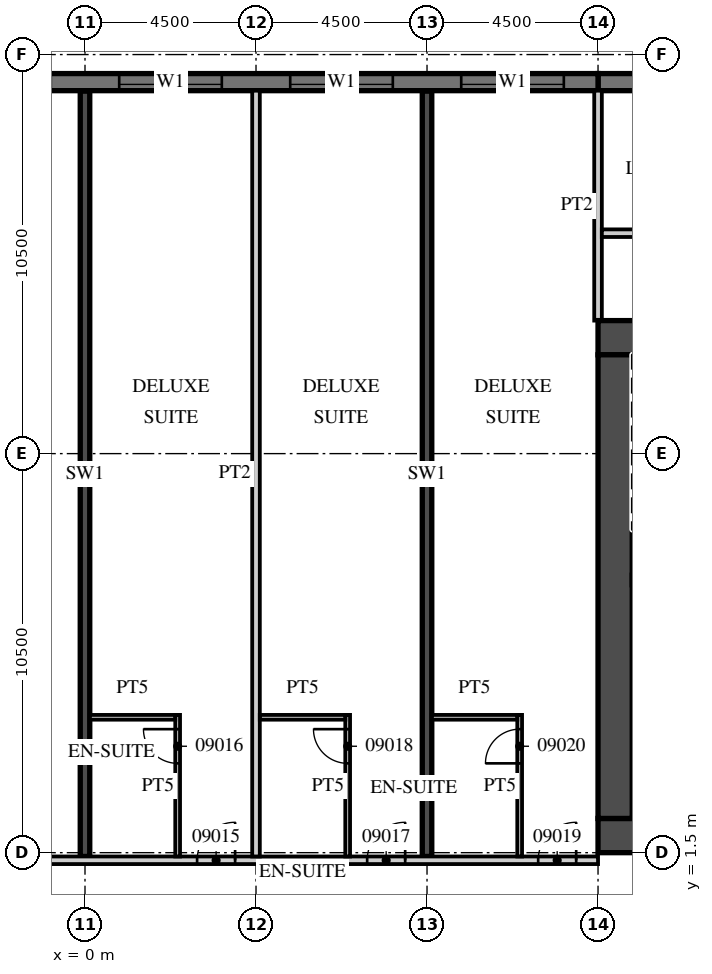
"""IFC4 building model, lengths in metres.
Left out: names, types, materials, properties, quantities, classifications, styles, units other than length and angle.
Written with IfcOpenShell. Run it as: python <this file> out.ifc"""

import sys

from ifc_helpers import new_model, si_unit, direction, frame, frame_2d, origin, place, context, subcontext, project, spatial, rectangle, extrude, element, fill, save


model = new_model("IFC4")
c1 = context("Model", 3, precision=1e-05, world=origin(), true_north=direction((0.0, 1.0)))
c2 = subcontext(c1, "Body", "Model", "MODEL_VIEW")
j1 = project(units=[si_unit("LENGTHUNIT", "METRE"), si_unit("PLANEANGLEUNIT", "RADIAN")], contexts=[c1])
p1 = place(None, origin())
s1 = spatial("IfcSite", under=j1, at=p1, CompositionType="ELEMENT")
p2 = place(p1, origin())
s2 = spatial("IfcBuilding", under=s1, at=p2, CompositionType="ELEMENT")
p3 = place(p2, frame((0.0, 0.0, 60.0)))
s3 = spatial("IfcBuildingStorey", under=s2, at=p3, CompositionType="ELEMENT", Elevation=60.0)
for number, where, z_axis, x_axis in (
    (1, (0.0, 1.4, 0.0), (0.0, 0.0, 1.0), (0.0, 1.0, 0.0)),
    (2, (9.0, 1.4, 0.0), (0.0, 0.0, 1.0), (0.0, 1.0, 0.0)),
):
    element("IfcWall", number, at=place(p3, frame(where, z_axis=z_axis, x_axis=x_axis)), inside=s3, PredefinedType="SHEAR", context=c2, shape_type="SweptSolid", body=[
        extrude(rectangle(XDim=20.14, YDim=0.25, at=frame_2d((10.07, 0.0))), origin(), (0.0, 0.0, 1.0), 3.3),
    ])
p4 = place(p3, frame((31.5, 21.775, 0.0), z_axis=(0.0, 0.0, 1.0), x_axis=(-1.0, 0.0, 0.0)))
e3 = element("IfcWall", 3, at=p4, inside=s3, PredefinedType="SOLIDWALL", context=c2, shape_type="SweptSolid", body=[
    extrude(rectangle(XDim=18.0, YDim=0.45, at=frame_2d((9.0, 0.0))), origin(), (0.0, 0.0, 1.0), 3.02),
])
p5 = place(p3, frame((13.5, 21.775, 0.0), z_axis=(0.0, 0.0, 1.0), x_axis=(-1.0, 0.0, 0.0)))
e4 = element("IfcWall", 4, at=p5, inside=s3, PredefinedType="SOLIDWALL", context=c2, shape_type="SweptSolid", body=[
    extrude(rectangle(XDim=54.5, YDim=0.45, at=frame_2d((27.25, 0.0))), origin(), (0.0, 0.0, 1.0), 3.02),
])
p6 = place(p5, frame((0.9, 0.0, 0.45)))
e5 = element("IfcOpeningElement", 5, at=p6, cuts=e4, PredefinedType="OPENING", context=c2, shape_type="SweptSolid", body=[
    extrude(rectangle(XDim=2.7, YDim=2.25, at=frame_2d((1.35, 1.125))), frame((0.0, 0.235, 0.0), z_axis=(0.0, -1.0, 0.0), x_axis=(1.0, 0.0, 0.0)), (0.0, 0.0, 1.0), 0.47),
])
p7 = place(p5, frame((5.4, 0.0, 0.45)))
e6 = element("IfcOpeningElement", 6, at=p7, cuts=e4, PredefinedType="OPENING", context=c2, shape_type="SweptSolid", body=[
    extrude(rectangle(XDim=2.7, YDim=2.25, at=frame_2d((1.35, 1.125))), frame((0.0, 0.235, 0.0), z_axis=(0.0, -1.0, 0.0), x_axis=(1.0, 0.0, 0.0)), (0.0, 0.0, 1.0), 0.47),
])
p8 = place(p5, frame((9.9, 0.0, 0.45)))
e7 = element("IfcOpeningElement", 7, at=p8, cuts=e4, PredefinedType="OPENING", context=c2, shape_type="SweptSolid", body=[
    extrude(rectangle(XDim=2.7, YDim=2.25, at=frame_2d((1.35, 1.125))), frame((0.0, 0.235, 0.0), z_axis=(0.0, -1.0, 0.0), x_axis=(1.0, 0.0, 0.0)), (0.0, 0.0, 1.0), 0.47),
])
p9 = place(p5, frame((14.4, 0.0, 0.45)))
e8 = element("IfcOpeningElement", 8, at=p9, cuts=e4, PredefinedType="OPENING", context=c2, shape_type="SweptSolid", body=[
    extrude(rectangle(XDim=2.7, YDim=2.25, at=frame_2d((1.35, 1.125))), frame((0.0, 0.235, 0.0), z_axis=(0.0, -1.0, 0.0), x_axis=(1.0, 0.0, 0.0)), (0.0, 0.0, 1.0), 0.47),
])
p10 = place(p5, frame((18.9, 0.0, 0.45)))
e9 = element("IfcOpeningElement", 9, at=p10, cuts=e4, PredefinedType="OPENING", context=c2, shape_type="SweptSolid", body=[
    extrude(rectangle(XDim=2.7, YDim=2.25, at=frame_2d((1.35, 1.125))), frame((0.0, 0.235, 0.0), z_axis=(0.0, -1.0, 0.0), x_axis=(1.0, 0.0, 0.0)), (0.0, 0.0, 1.0), 0.47),
])
p11 = place(p5, frame((23.4, 0.0, 0.45)))
e10 = element("IfcOpeningElement", 10, at=p11, cuts=e4, PredefinedType="OPENING", context=c2, shape_type="SweptSolid", body=[
    extrude(rectangle(XDim=2.7, YDim=2.25, at=frame_2d((1.35, 1.125))), frame((0.0, 0.235, 0.0), z_axis=(0.0, -1.0, 0.0), x_axis=(1.0, 0.0, 0.0)), (0.0, 0.0, 1.0), 0.47),
])
p12 = place(p5, frame((27.9, 0.0, 0.45)))
e11 = element("IfcOpeningElement", 11, at=p12, cuts=e4, PredefinedType="OPENING", context=c2, shape_type="SweptSolid", body=[
    extrude(rectangle(XDim=2.7, YDim=2.25, at=frame_2d((1.35, 1.125))), frame((0.0, 0.235, 0.0), z_axis=(0.0, -1.0, 0.0), x_axis=(1.0, 0.0, 0.0)), (0.0, 0.0, 1.0), 0.47),
])
p13 = place(p5, frame((32.4, 0.0, 0.45)))
e12 = element("IfcOpeningElement", 12, at=p13, cuts=e4, PredefinedType="OPENING", context=c2, shape_type="SweptSolid", body=[
    extrude(rectangle(XDim=2.7, YDim=2.25, at=frame_2d((1.35, 1.125))), frame((0.0, 0.235, 0.0), z_axis=(0.0, -1.0, 0.0), x_axis=(1.0, 0.0, 0.0)), (0.0, 0.0, 1.0), 0.47),
])
p14 = place(p5, frame((36.9, 0.0, 0.45)))
e13 = element("IfcOpeningElement", 13, at=p14, cuts=e4, PredefinedType="OPENING", context=c2, shape_type="SweptSolid", body=[
    extrude(rectangle(XDim=2.7, YDim=2.25, at=frame_2d((1.35, 1.125))), frame((0.0, 0.235, 0.0), z_axis=(0.0, -1.0, 0.0), x_axis=(1.0, 0.0, 0.0)), (0.0, 0.0, 1.0), 0.47),
])
p15 = place(p5, frame((41.4, 0.0, 0.45)))
e14 = element("IfcOpeningElement", 14, at=p15, cuts=e4, PredefinedType="OPENING", context=c2, shape_type="SweptSolid", body=[
    extrude(rectangle(XDim=2.7, YDim=2.25, at=frame_2d((1.35, 1.125))), frame((0.0, 0.235, 0.0), z_axis=(0.0, -1.0, 0.0), x_axis=(1.0, 0.0, 0.0)), (0.0, 0.0, 1.0), 0.47),
])
p16 = place(p5, frame((45.9, 0.0, 0.45)))
e15 = element("IfcOpeningElement", 15, at=p16, cuts=e4, PredefinedType="OPENING", context=c2, shape_type="SweptSolid", body=[
    extrude(rectangle(XDim=2.7, YDim=2.25, at=frame_2d((1.35, 1.125))), frame((0.0, 0.235, 0.0), z_axis=(0.0, -1.0, 0.0), x_axis=(1.0, 0.0, 0.0)), (0.0, 0.0, 1.0), 0.47),
])
p17 = place(p5, frame((50.4, 0.0, 0.45)))
e16 = element("IfcOpeningElement", 16, at=p17, cuts=e4, PredefinedType="OPENING", context=c2, shape_type="SweptSolid", body=[
    extrude(rectangle(XDim=2.7, YDim=2.25, at=frame_2d((1.35, 1.125))), frame((0.0, 0.235, 0.0), z_axis=(0.0, -1.0, 0.0), x_axis=(1.0, 0.0, 0.0)), (0.0, 0.0, 1.0), 0.47),
])
p18 = place(p3, frame((13.5, 15.5, 0.0), z_axis=(0.0, 0.0, 1.0), x_axis=(0.0, 1.0, 0.0)))
e17 = element("IfcWall", 17, at=p18, inside=s3, PredefinedType="PARTITIONING", context=c2, shape_type="SweptSolid", body=[
    extrude(rectangle(XDim=6.05, YDim=0.2, at=frame_2d((3.025, 0.0))), origin(), (0.0, 0.0, 1.0), 3.02),
])
p19 = place(p3, frame((-44.55, 1.3, 0.0), z_axis=(0.0, 0.0, 1.0), x_axis=(1.0, 0.0, 0.0)))
e18 = element("IfcWall", 18, at=p19, inside=s3, PredefinedType="PARTITIONING", context=c2, shape_type="SweptSolid", body=[
    extrude(rectangle(XDim=58.05, YDim=0.2, at=frame_2d((29.025, 0.0))), origin(), (0.0, 0.0, 1.0), 3.02),
])
p20 = place(p19, frame((0.525, 0.0, 0.0)))
e19 = element("IfcOpeningElement", 19, at=p20, cuts=e18, PredefinedType="OPENING", context=c2, shape_type="SweptSolid", body=[
    extrude(rectangle(XDim=1.0, YDim=2.1, at=frame_2d((0.5, 1.05))), frame((0.0, 0.11, 0.0), z_axis=(0.0, -1.0, 0.0), x_axis=(1.0, 0.0, 0.0)), (0.0, 0.0, 1.0), 0.22),
])
p21 = place(p19, frame((6.975, 0.0, 0.0)))
e20 = element("IfcOpeningElement", 20, at=p21, cuts=e18, PredefinedType="OPENING", context=c2, shape_type="SweptSolid", body=[
    extrude(rectangle(XDim=1.0, YDim=2.1, at=frame_2d((0.5, 1.05))), frame((0.0, 0.11, 0.0), z_axis=(0.0, -1.0, 0.0), x_axis=(1.0, 0.0, 0.0)), (0.0, 0.0, 1.0), 0.22),
])
p22 = place(p19, frame((10.987, 0.0, 0.0)))
e21 = element("IfcOpeningElement", 21, at=p22, cuts=e18, PredefinedType="OPENING", context=c2, shape_type="SweptSolid", body=[
    extrude(rectangle(XDim=1.2, YDim=2.1, at=frame_2d((0.6, 1.05))), frame((0.0, 0.11, 0.0), z_axis=(0.0, -1.0, 0.0), x_axis=(1.0, 0.0, 0.0)), (0.0, 0.0, 1.0), 0.22),
])
p23 = place(p19, frame((19.987, 0.0, 0.0)))
e22 = element("IfcOpeningElement", 22, at=p23, cuts=e18, PredefinedType="OPENING", context=c2, shape_type="SweptSolid", body=[
    extrude(rectangle(XDim=1.2, YDim=2.1, at=frame_2d((0.6, 1.05))), frame((0.0, 0.11, 0.0), z_axis=(0.0, -1.0, 0.0), x_axis=(1.0, 0.0, 0.0)), (0.0, 0.0, 1.0), 0.22),
])
p24 = place(p19, frame((29.5, 0.0, 0.0)))
e23 = element("IfcOpeningElement", 23, at=p24, cuts=e18, PredefinedType="OPENING", context=c2, shape_type="SweptSolid", body=[
    extrude(rectangle(XDim=1.0, YDim=2.1, at=frame_2d((0.5, 1.05))), frame((0.0, 0.11, 0.0), z_axis=(0.0, -1.0, 0.0), x_axis=(1.0, 0.0, 0.0)), (0.0, 0.0, 1.0), 0.22),
])
p25 = place(p19, frame((33.975, 0.0, 0.0)))
e24 = element("IfcOpeningElement", 24, at=p25, cuts=e18, PredefinedType="OPENING", context=c2, shape_type="SweptSolid", body=[
    extrude(rectangle(XDim=1.0, YDim=2.1, at=frame_2d((0.5, 1.05))), frame((0.0, 0.11, 0.0), z_axis=(0.0, -1.0, 0.0), x_axis=(1.0, 0.0, 0.0)), (0.0, 0.0, 1.0), 0.22),
])
p26 = place(p19, frame((40.912, 0.0, 0.0)))
e25 = element("IfcOpeningElement", 25, at=p26, cuts=e18, PredefinedType="OPENING", context=c2, shape_type="SweptSolid", body=[
    extrude(rectangle(XDim=1.2, YDim=2.1, at=frame_2d((0.6, 1.05))), frame((0.0, 0.11, 0.0), z_axis=(0.0, -1.0, 0.0), x_axis=(1.0, 0.0, 0.0)), (0.0, 0.0, 1.0), 0.22),
])
p27 = place(p19, frame((47.5, 0.0, 0.0)))
e26 = element("IfcOpeningElement", 26, at=p27, cuts=e18, PredefinedType="OPENING", context=c2, shape_type="SweptSolid", body=[
    extrude(rectangle(XDim=1.0, YDim=2.1, at=frame_2d((0.5, 1.05))), frame((0.0, 0.11, 0.0), z_axis=(0.0, -1.0, 0.0), x_axis=(1.0, 0.0, 0.0)), (0.0, 0.0, 1.0), 0.22),
])
p28 = place(p19, frame((51.975, 0.0, 0.0)))
e27 = element("IfcOpeningElement", 27, at=p28, cuts=e18, PredefinedType="OPENING", context=c2, shape_type="SweptSolid", body=[
    extrude(rectangle(XDim=1.0, YDim=2.1, at=frame_2d((0.5, 1.05))), frame((0.0, 0.11, 0.0), z_axis=(0.0, -1.0, 0.0), x_axis=(1.0, 0.0, 0.0)), (0.0, 0.0, 1.0), 0.22),
])
p29 = place(p19, frame((56.475, 0.0, 0.0)))
e28 = element("IfcOpeningElement", 28, at=p29, cuts=e18, PredefinedType="OPENING", context=c2, shape_type="SweptSolid", body=[
    extrude(rectangle(XDim=1.0, YDim=2.1, at=frame_2d((0.5, 1.05))), frame((0.0, 0.11, 0.0), z_axis=(0.0, -1.0, 0.0), x_axis=(1.0, 0.0, 0.0)), (0.0, 0.0, 1.0), 0.22),
])
p30 = place(p3, frame((4.5, 1.4, 0.0), z_axis=(0.0, 0.0, 1.0), x_axis=(0.0, 1.0, 0.0)))
e29 = element("IfcWall", 29, at=p30, inside=s3, PredefinedType="PARTITIONING", context=c2, shape_type="SweptSolid", body=[
    extrude(rectangle(XDim=20.15, YDim=0.2, at=frame_2d((10.075, 0.0))), origin(), (0.0, 0.0, 1.0), 3.02),
])
p31 = place(p3, frame((2.438, 1.4, 0.0), z_axis=(0.0, 0.0, 1.0), x_axis=(0.0, 1.0, 0.0)))
e30 = element("IfcWall", 30, at=p31, inside=s3, PredefinedType="PARTITIONING", context=c2, shape_type="SweptSolid", body=[
    extrude(rectangle(XDim=3.725, YDim=0.125, at=frame_2d((1.863, 0.0))), origin(), (0.0, 0.0, 1.0), 3.02),
])
p32 = place(p31, frame((2.45, 0.0, 0.0)))
e31 = element("IfcOpeningElement", 31, at=p32, cuts=e30, PredefinedType="OPENING", context=c2, shape_type="SweptSolid", body=[
    extrude(rectangle(XDim=0.9, YDim=2.1, at=frame_2d((0.45, 1.05))), frame((0.0, 0.073, 0.0), z_axis=(0.0, -1.0, 0.0), x_axis=(1.0, 0.0, 0.0)), (0.0, 0.0, 1.0), 0.145),
])
p33 = place(p3, frame((0.125, 5.062, 0.0), z_axis=(0.0, 0.0, 1.0), x_axis=(1.0, 0.0, 0.0)))
e32 = element("IfcWall", 32, at=p33, inside=s3, PredefinedType="PARTITIONING", context=c2, shape_type="SweptSolid", body=[
    extrude(rectangle(XDim=2.25, YDim=0.125, at=frame_2d((1.125, 0.0))), origin(), (0.0, 0.0, 1.0), 3.02),
])
p34 = place(p3, frame((6.912, 1.4, 0.0), z_axis=(0.0, 0.0, 1.0), x_axis=(0.0, 1.0, 0.0)))
e33 = element("IfcWall", 33, at=p34, inside=s3, PredefinedType="PARTITIONING", context=c2, shape_type="SweptSolid", body=[
    extrude(rectangle(XDim=3.725, YDim=0.125, at=frame_2d((1.863, 0.0))), origin(), (0.0, 0.0, 1.0), 3.02),
])
p35 = place(p34, frame((2.45, 0.0, 0.0)))
e34 = element("IfcOpeningElement", 34, at=p35, cuts=e33, PredefinedType="OPENING", context=c2, shape_type="SweptSolid", body=[
    extrude(rectangle(XDim=0.9, YDim=2.1, at=frame_2d((0.45, 1.05))), frame((0.0, 0.073, 0.0), z_axis=(0.0, -1.0, 0.0), x_axis=(1.0, 0.0, 0.0)), (0.0, 0.0, 1.0), 0.145),
])
p36 = place(p3, frame((4.6, 5.062, 0.0), z_axis=(0.0, 0.0, 1.0), x_axis=(1.0, 0.0, 0.0)))
e35 = element("IfcWall", 35, at=p36, inside=s3, PredefinedType="PARTITIONING", context=c2, shape_type="SweptSolid", body=[
    extrude(rectangle(XDim=2.25, YDim=0.125, at=frame_2d((1.125, 0.0))), origin(), (0.0, 0.0, 1.0), 3.02),
])
p37 = place(p3, frame((11.438, 1.4, 0.0), z_axis=(0.0, 0.0, 1.0), x_axis=(0.0, 1.0, 0.0)))
e36 = element("IfcWall", 36, at=p37, inside=s3, PredefinedType="PARTITIONING", context=c2, shape_type="SweptSolid", body=[
    extrude(rectangle(XDim=3.725, YDim=0.125, at=frame_2d((1.863, 0.0))), origin(), (0.0, 0.0, 1.0), 3.02),
])
p38 = place(p37, frame((2.45, 0.0, 0.0)))
e37 = element("IfcOpeningElement", 37, at=p38, cuts=e36, PredefinedType="OPENING", context=c2, shape_type="SweptSolid", body=[
    extrude(rectangle(XDim=0.9, YDim=2.1, at=frame_2d((0.45, 1.05))), frame((0.0, 0.073, 0.0), z_axis=(0.0, -1.0, 0.0), x_axis=(1.0, 0.0, 0.0)), (0.0, 0.0, 1.0), 0.145),
])
p39 = place(p3, frame((9.125, 5.062, 0.0), z_axis=(0.0, 0.0, 1.0), x_axis=(1.0, 0.0, 0.0)))
e38 = element("IfcWall", 38, at=p39, inside=s3, PredefinedType="PARTITIONING", context=c2, shape_type="SweptSolid", body=[
    extrude(rectangle(XDim=2.25, YDim=0.125, at=frame_2d((1.125, 0.0))), origin(), (0.0, 0.0, 1.0), 3.02),
])
p40 = place(p3, frame((13.5, 1.95, 0.0), z_axis=(0.0, 0.0, 1.0), x_axis=(1.0, 0.0, 0.0)))
e39 = element("IfcWall", 39, at=p40, inside=s3, PredefinedType="SHEAR", context=c2, shape_type="SweptSolid", body=[
    extrude(rectangle(XDim=18.0, YDim=0.9, at=frame_2d((9.0, 0.0))), origin(), (0.0, 0.0, 1.0), 3.02),
])
p41 = place(p40, frame((1.475, 0.0, 0.0)))
e40 = element("IfcOpeningElement", 40, at=p41, cuts=e39, PredefinedType="OPENING", context=c2, shape_type="SweptSolid", body=[
    extrude(rectangle(XDim=1.8, YDim=2.1, at=frame_2d((0.9, 1.05))), frame((0.0, 0.46, 0.0), z_axis=(0.0, -1.0, 0.0), x_axis=(1.0, 0.0, 0.0)), (0.0, 0.0, 1.0), 0.92),
])
p42 = place(p3, frame((13.5, 15.05, 0.0), z_axis=(0.0, 0.0, 1.0), x_axis=(1.0, 0.0, 0.0)))
e41 = element("IfcWall", 41, at=p42, inside=s3, PredefinedType="SHEAR", context=c2, shape_type="SweptSolid", body=[
    extrude(rectangle(XDim=6.8, YDim=0.9, at=frame_2d((3.4, 0.0))), origin(), (0.0, 0.0, 1.0), 3.02),
])
p43 = place(p42, frame((4.725, 0.0, 0.0)))
e42 = element("IfcOpeningElement", 42, at=p43, cuts=e41, PredefinedType="OPENING", context=c2, shape_type="SweptSolid", body=[
    extrude(rectangle(XDim=1.2, YDim=2.1, at=frame_2d((0.6, 1.05))), frame((0.0, 0.46, 0.0), z_axis=(0.0, -1.0, 0.0), x_axis=(1.0, 0.0, 0.0)), (0.0, 0.0, 1.0), 0.92),
])
p44 = place(p3, frame((13.95, 2.4, 0.0), z_axis=(0.0, 0.0, 1.0), x_axis=(0.0, 1.0, 0.0)))
e43 = element("IfcWall", 43, at=p44, inside=s3, PredefinedType="SHEAR", context=c2, shape_type="SweptSolid", body=[
    extrude(rectangle(XDim=12.2, YDim=0.9, at=frame_2d((6.1, 0.0))), origin(), (0.0, 0.0, 1.0), 3.02),
])
p45 = place(p3, frame((13.6, 17.8, 0.0), z_axis=(0.0, 0.0, 1.0), x_axis=(1.0, 0.0, 0.0)))
e44 = element("IfcWall", 44, at=p45, inside=s3, PredefinedType="PARTITIONING", context=c2, shape_type="SweptSolid", body=[
    extrude(rectangle(XDim=30.95, YDim=0.2, at=frame_2d((15.475, 0.0))), origin(), (0.0, 0.0, 1.0), 3.02),
])
p46 = place(p45, frame((16.613, 0.0, 0.0)))
e45 = element("IfcOpeningElement", 45, at=p46, cuts=e44, PredefinedType="OPENING", context=c2, shape_type="SweptSolid", body=[
    extrude(rectangle(XDim=0.9, YDim=2.1, at=frame_2d((0.45, 1.05))), frame((0.0, 0.11, 0.0), z_axis=(0.0, -1.0, 0.0), x_axis=(1.0, 0.0, 0.0)), (0.0, 0.0, 1.0), 0.22),
])
p47 = place(p45, frame((8.312, 0.0, 0.0)))
e46 = element("IfcOpeningElement", 46, at=p47, cuts=e44, PredefinedType="OPENING", context=c2, shape_type="SweptSolid", body=[
    extrude(rectangle(XDim=0.9, YDim=2.1, at=frame_2d((0.45, 1.05))), frame((0.0, 0.11, 0.0), z_axis=(0.0, -1.0, 0.0), x_axis=(1.0, 0.0, 0.0)), (0.0, 0.0, 1.0), 0.22),
])
p48 = place(p6, origin())
e47 = element("IfcWindow", 47, at=p48, inside=s3, PartitioningType="SINGLE_PANEL", PredefinedType="WINDOW", context=c2, shape_type="SweptSolid", body=[
    extrude(rectangle(XDim=2.7, YDim=2.25, at=frame_2d((1.35, 1.125))), frame((0.0, 0.09, 0.0), z_axis=(0.0, -1.0, 0.0), x_axis=(1.0, 0.0, 0.0)), (0.0, 0.0, 1.0), 0.06),
])
fill(e5, e47)
p49 = place(p7, origin())
e48 = element("IfcWindow", 48, at=p49, inside=s3, PartitioningType="SINGLE_PANEL", PredefinedType="WINDOW", context=c2, shape_type="SweptSolid", body=[
    extrude(rectangle(XDim=2.7, YDim=2.25, at=frame_2d((1.35, 1.125))), frame((0.0, 0.09, 0.0), z_axis=(0.0, -1.0, 0.0), x_axis=(1.0, 0.0, 0.0)), (0.0, 0.0, 1.0), 0.06),
])
fill(e6, e48)
p50 = place(p8, origin())
e49 = element("IfcWindow", 49, at=p50, inside=s3, PartitioningType="SINGLE_PANEL", PredefinedType="WINDOW", context=c2, shape_type="SweptSolid", body=[
    extrude(rectangle(XDim=2.7, YDim=2.25, at=frame_2d((1.35, 1.125))), frame((0.0, 0.09, 0.0), z_axis=(0.0, -1.0, 0.0), x_axis=(1.0, 0.0, 0.0)), (0.0, 0.0, 1.0), 0.06),
])
fill(e7, e49)
p51 = place(p27, origin())
e50 = element("IfcDoor", 50, at=p51, inside=s3, OperationType="SINGLE_SWING_RIGHT", PredefinedType="DOOR", context=c2, shape_type="SweptSolid", body=[
    extrude(rectangle(XDim=1.0, YDim=2.1, at=frame_2d((0.5, 1.05))), frame((0.0, 0.025, 0.0), z_axis=(0.0, -1.0, 0.0), x_axis=(1.0, 0.0, 0.0)), (0.0, 0.0, 1.0), 0.05),
])
fill(e26, e50)
p52 = place(p32, origin())
e51 = element("IfcDoor", 51, at=p52, inside=s3, OperationType="SINGLE_SWING_RIGHT", PredefinedType="DOOR", context=c2, shape_type="SweptSolid", body=[
    extrude(rectangle(XDim=0.9, YDim=2.1, at=frame_2d((0.45, 1.05))), frame((0.0, 0.025, 0.0), z_axis=(0.0, -1.0, 0.0), x_axis=(1.0, 0.0, 0.0)), (0.0, 0.0, 1.0), 0.05),
])
fill(e31, e51)
p53 = place(p28, origin())
e52 = element("IfcDoor", 52, at=p53, inside=s3, OperationType="SINGLE_SWING_RIGHT", PredefinedType="DOOR", context=c2, shape_type="SweptSolid", body=[
    extrude(rectangle(XDim=1.0, YDim=2.1, at=frame_2d((0.5, 1.05))), frame((0.0, 0.025, 0.0), z_axis=(0.0, -1.0, 0.0), x_axis=(1.0, 0.0, 0.0)), (0.0, 0.0, 1.0), 0.05),
])
fill(e27, e52)
p54 = place(p35, origin())
e53 = element("IfcDoor", 53, at=p54, inside=s3, OperationType="SINGLE_SWING_RIGHT", PredefinedType="DOOR", context=c2, shape_type="SweptSolid", body=[
    extrude(rectangle(XDim=0.9, YDim=2.1, at=frame_2d((0.45, 1.05))), frame((0.0, 0.025, 0.0), z_axis=(0.0, -1.0, 0.0), x_axis=(1.0, 0.0, 0.0)), (0.0, 0.0, 1.0), 0.05),
])
fill(e34, e53)
p55 = place(p29, origin())
e54 = element("IfcDoor", 54, at=p55, inside=s3, OperationType="SINGLE_SWING_RIGHT", PredefinedType="DOOR", context=c2, shape_type="SweptSolid", body=[
    extrude(rectangle(XDim=1.0, YDim=2.1, at=frame_2d((0.5, 1.05))), frame((0.0, 0.025, 0.0), z_axis=(0.0, -1.0, 0.0), x_axis=(1.0, 0.0, 0.0)), (0.0, 0.0, 1.0), 0.05),
])
fill(e28, e54)
p56 = place(p38, origin())
e55 = element("IfcDoor", 55, at=p56, inside=s3, OperationType="SINGLE_SWING_LEFT", PredefinedType="DOOR", context=c2, shape_type="SweptSolid", body=[
    extrude(rectangle(XDim=0.9, YDim=2.1, at=frame_2d((0.45, 1.05))), frame((0.0, 0.025, 0.0), z_axis=(0.0, -1.0, 0.0), x_axis=(1.0, 0.0, 0.0)), (0.0, 0.0, 1.0), 0.05),
])
fill(e37, e55)
save(model, sys.argv[1])
